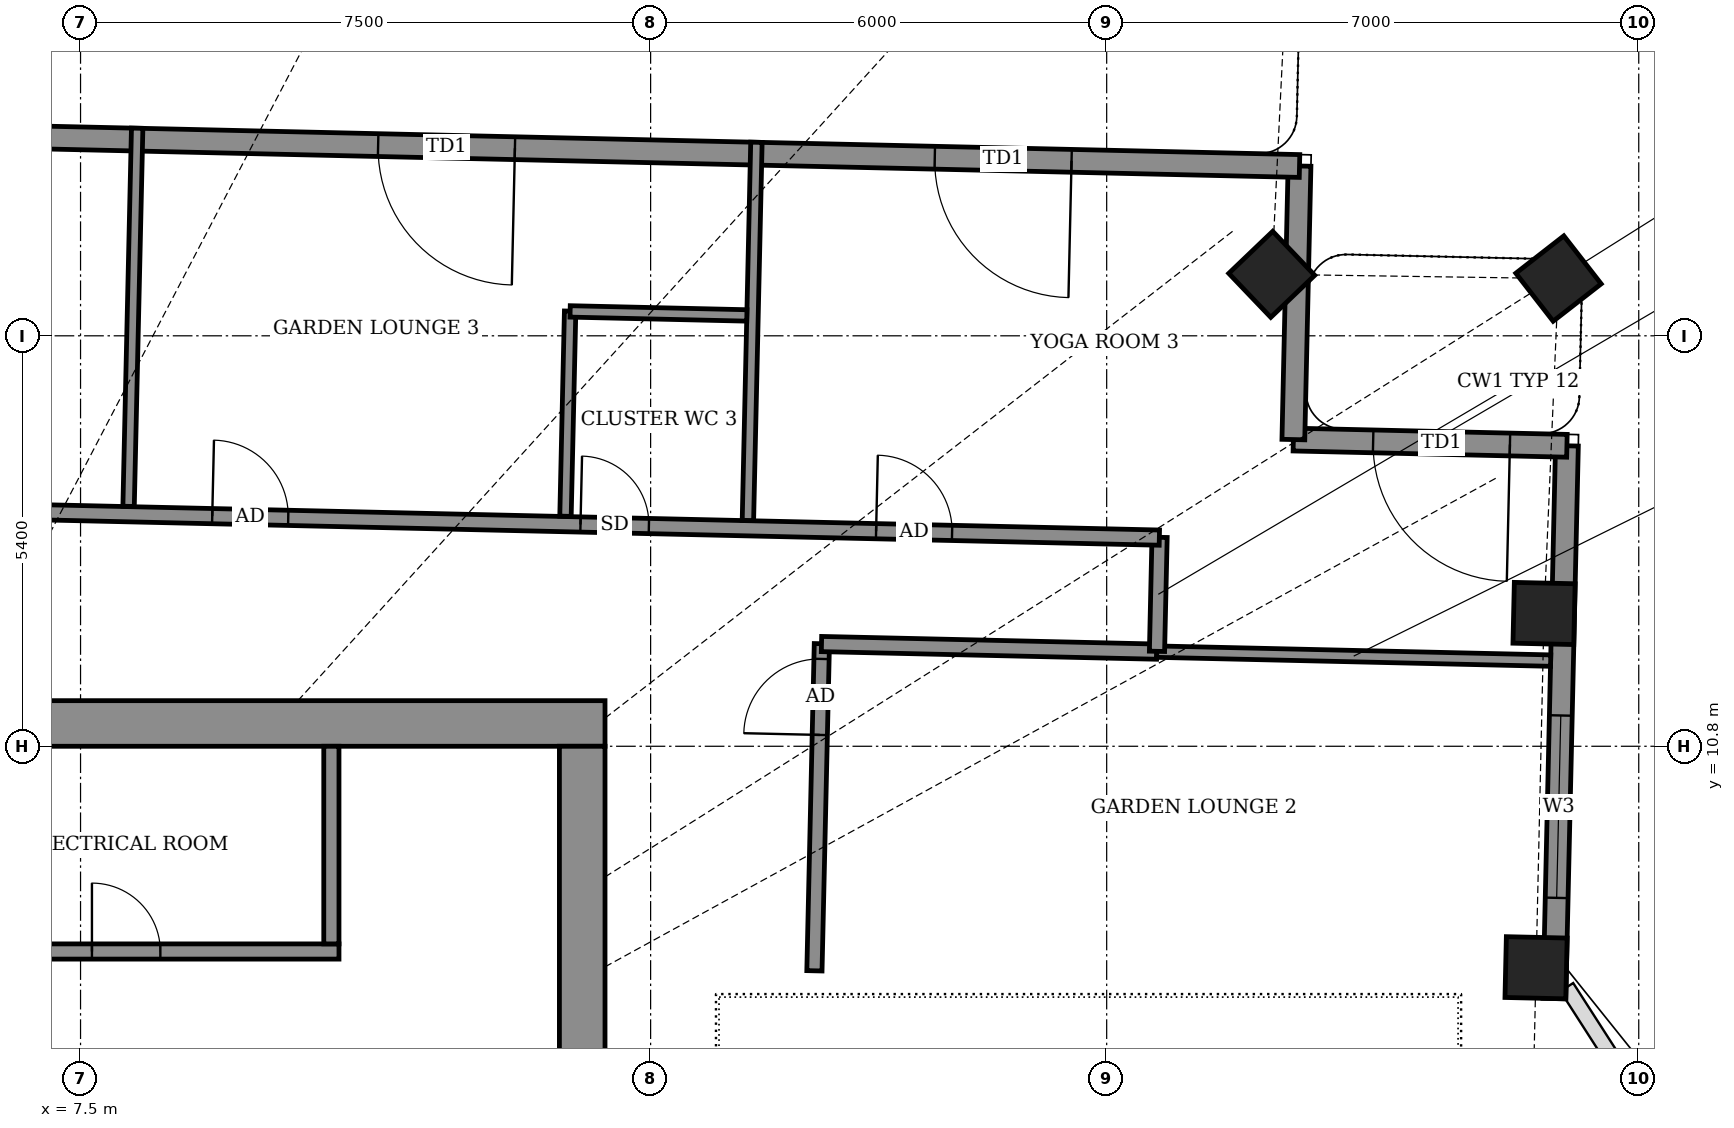
"""IFC4 building model, lengths in metres.
Left out: names, types, materials, properties, quantities, classifications, styles, units other than length and angle.
Written with IfcOpenShell. Run it as: python <this file> out.ifc"""

import sys

from ifc_helpers import new_model, si_unit, direction, frame, frame_2d, origin, origin_2d, place, context, subcontext, project, spatial, rectangle, extrude, element, fill, save


model = new_model("IFC4")
c1 = context("Model", 3, precision=1e-05, world=origin(), true_north=direction((0.0, 1.0)))
c2 = subcontext(c1, "Body", "Model", "MODEL_VIEW")
j1 = project(units=[si_unit("LENGTHUNIT", "METRE"), si_unit("PLANEANGLEUNIT", "RADIAN")], contexts=[c1])
p1 = place(None, origin())
s1 = spatial("IfcSite", under=j1, at=p1, CompositionType="ELEMENT")
p2 = place(p1, origin())
s2 = spatial("IfcBuilding", under=s1, at=p2, CompositionType="ELEMENT")
p3 = place(p2, frame((0.0, 0.0, 346.1)))
s3 = spatial("IfcBuildingStorey", under=s2, at=p3, CompositionType="ELEMENT", Elevation=346.1)
for number, where, z_axis, x_axis in (
    (1, (26.649, 7.886, -0.55), (0.0, 0.0, 1.0), (0.023, 1.0, 0.0)),
    (2, (26.754, 12.547, -0.55), (0.0, 0.0, 1.0), (0.023, 1.0, 0.0)),
    (3, (26.944, 16.953, -0.55), (0.0, 0.0, 1.0), (-0.614, 0.789, 0.0)),
    (4, (23.172, 17.009, -0.55), (0.0, 0.0, 1.0), (-0.691, 0.723, 0.0)),
):
    element("IfcColumn", number, at=place(p3, frame(where, z_axis=z_axis, x_axis=x_axis)), inside=s3, PredefinedType="COLUMN", context=c2, shape_type="SweptSolid", body=[
        extrude(rectangle(XDim=0.8, YDim=0.8, at=origin_2d()), origin(), (0.0, 0.0, 1.0), 4.6),
    ])
p4 = place(p3, frame((26.89, 7.481, 0.0), z_axis=(0.0, 0.0, 1.0), x_axis=(0.02268938335, 0.999742562805, 0.0)))
e5 = element("IfcWall", 5, at=p4, inside=s3, PredefinedType="SOLIDWALL", context=c2, shape_type="SweptSolid", body=[
    extrude(rectangle(XDim=7.274, YDim=0.3, at=frame_2d((3.637, 0.0))), origin(), (0.0, 0.0, 1.0), 2.75),
])
p5 = place(p4, frame((1.325, 0.0, 0.9)))
e6 = element("IfcOpeningElement", 6, at=p5, cuts=e5, PredefinedType="OPENING", context=c2, shape_type="SweptSolid", body=[
    extrude(rectangle(XDim=2.4, YDim=1.8, at=frame_2d((1.2, 0.9))), frame((0.0, 0.16, 0.0), z_axis=(0.0, -1.0, 0.0), x_axis=(1.0, 0.0, 0.0)), (0.0, 0.0, 1.0), 0.32),
])
p6 = place(p3, frame((27.055, 14.753, 0.0), z_axis=(0.0, 0.0, 1.0), x_axis=(-0.999740327787, 0.022787650101, 0.0)))
e7 = element("IfcWall", 7, at=p6, inside=s3, PredefinedType="SOLIDWALL", context=c2, shape_type="SweptSolid", body=[
    extrude(rectangle(XDim=3.6, YDim=0.3, at=frame_2d((1.8, 0.0))), origin(), (0.0, 0.0, 1.0), 2.55),
])
p7 = place(p6, frame((0.75, 0.0, 0.0)))
e8 = element("IfcOpeningElement", 8, at=p7, cuts=e7, PredefinedType="OPENING", context=c2, shape_type="SweptSolid", body=[
    extrude(rectangle(XDim=1.8, YDim=2.4, at=frame_2d((0.9, 1.2))), frame((0.0, 0.16, 0.0), z_axis=(0.0, -1.0, 0.0), x_axis=(1.0, 0.0, 0.0)), (0.0, 0.0, 1.0), 0.32),
])
p8 = place(p3, frame((23.456, 14.835, 0.0), z_axis=(0.0, 0.0, 1.0), x_axis=(0.022514980321, 0.999746505701, 0.0)))
e9 = element("IfcWall", 9, at=p8, inside=s3, PredefinedType="SOLIDWALL", context=c2, shape_type="SweptSolid", body=[
    extrude(rectangle(XDim=3.6, YDim=0.3, at=frame_2d((1.8, 0.0))), origin(), (0.0, 0.0, 1.0), 2.55),
])
p9 = place(p3, frame((23.537, 18.434, 0.0), z_axis=(0.0, 0.0, 1.0), x_axis=(-0.999742787513, 0.022679480066, 0.0)))
e10 = element("IfcWall", 10, at=p9, inside=s3, PredefinedType="SOLIDWALL", context=c2, shape_type="SweptSolid", body=[
    extrude(rectangle(XDim=41.8, YDim=0.3, at=frame_2d((20.9, 0.0))), origin(), (0.0, 0.0, 1.0), 2.65),
])
p10 = place(p9, frame((3.0, 0.0, 0.0)))
e11 = element("IfcOpeningElement", 11, at=p10, cuts=e10, PredefinedType="OPENING", context=c2, shape_type="SweptSolid", body=[
    extrude(rectangle(XDim=1.8, YDim=2.4, at=frame_2d((0.9, 1.2))), frame((0.0, 0.16, 0.0), z_axis=(0.0, -1.0, 0.0), x_axis=(1.0, 0.0, 0.0)), (0.0, 0.0, 1.0), 0.32),
])
p11 = place(p9, frame((10.325, 0.0, 0.0)))
e12 = element("IfcOpeningElement", 12, at=p11, cuts=e10, PredefinedType="OPENING", context=c2, shape_type="SweptSolid", body=[
    extrude(rectangle(XDim=1.8, YDim=2.4, at=frame_2d((0.9, 1.2))), frame((0.0, 0.16, 0.0), z_axis=(0.0, -1.0, 0.0), x_axis=(1.0, 0.0, 0.0)), (0.0, 0.0, 1.0), 0.32),
])
p12 = place(p9, frame((18.025, 0.0, 0.0)))
e13 = element("IfcOpeningElement", 13, at=p12, cuts=e10, PredefinedType="OPENING", context=c2, shape_type="SweptSolid", body=[
    extrude(rectangle(XDim=1.8, YDim=2.4, at=frame_2d((0.9, 1.2))), frame((0.0, 0.16, 0.0), z_axis=(0.0, -1.0, 0.0), x_axis=(1.0, 0.0, 0.0)), (0.0, 0.0, 1.0), 0.32),
])
p13 = place(p9, frame((24.025, 0.0, 0.0)))
e14 = element("IfcOpeningElement", 14, at=p13, cuts=e10, PredefinedType="OPENING", context=c2, shape_type="SweptSolid", body=[
    extrude(rectangle(XDim=1.8, YDim=2.4, at=frame_2d((0.9, 1.2))), frame((0.0, 0.16, 0.0), z_axis=(0.0, -1.0, 0.0), x_axis=(1.0, 0.0, 0.0)), (0.0, 0.0, 1.0), 0.32),
])
p14 = place(p9, frame((30.05, 0.0, 0.0)))
e15 = element("IfcOpeningElement", 15, at=p14, cuts=e10, PredefinedType="OPENING", context=c2, shape_type="SweptSolid", body=[
    extrude(rectangle(XDim=1.8, YDim=2.4, at=frame_2d((0.9, 1.2))), frame((0.0, 0.16, 0.0), z_axis=(0.0, -1.0, 0.0), x_axis=(1.0, 0.0, 0.0)), (0.0, 0.0, 1.0), 0.32),
])
p15 = place(p9, frame((37.375, 0.0, 0.0)))
e16 = element("IfcOpeningElement", 16, at=p15, cuts=e10, PredefinedType="OPENING", context=c2, shape_type="SweptSolid", body=[
    extrude(rectangle(XDim=1.8, YDim=2.4, at=frame_2d((0.9, 1.2))), frame((0.0, 0.16, 0.0), z_axis=(0.0, -1.0, 0.0), x_axis=(1.0, 0.0, 0.0)), (0.0, 0.0, 1.0), 0.32),
])
p16 = place(p3, frame((17.155, 7.846, 0.0), z_axis=(0.0, 0.0, 1.0), x_axis=(0.022745886685, 0.999741278851, 0.0)))
e17 = element("IfcWall", 17, at=p16, inside=s3, PredefinedType="PARTITIONING", context=c2, shape_type="SweptSolid", body=[
    extrude(rectangle(XDim=4.304, YDim=0.2, at=frame_2d((2.152, 0.0))), origin(), (0.0, 0.0, 1.0), 2.55),
])
p17 = place(p16, frame((3.104, 0.0, 0.0)))
e18 = element("IfcOpeningElement", 18, at=p17, cuts=e17, PredefinedType="OPENING", context=c2, shape_type="SweptSolid", body=[
    extrude(rectangle(XDim=1.0, YDim=2.1, at=frame_2d((0.5, 1.05))), frame((0.0, 0.11, 0.0), z_axis=(0.0, -1.0, 0.0), x_axis=(1.0, 0.0, 0.0)), (0.0, 0.0, 1.0), 0.22),
])
p18 = place(p3, frame((17.248, 12.145, 0.0), z_axis=(0.0, 0.0, 1.0), x_axis=(0.999742606292, -0.022687467127, 0.0)))
e19 = element("IfcWall", 19, at=p18, inside=s3, PredefinedType="PARTITIONING", context=c2, shape_type="SweptSolid", body=[
    extrude(rectangle(XDim=4.412, YDim=0.2, at=frame_2d((2.206, 0.0))), origin(), (0.0, 0.0, 1.0), 2.55),
])
p19 = place(p3, frame((21.659, 12.045, 0.0), z_axis=(0.0, 0.0, 1.0), x_axis=(0.999741202945, -0.0227492227, 0.0)))
e20 = element("IfcWall", 20, at=p19, inside=s3, PredefinedType="PARTITIONING", context=c2, shape_type="SweptSolid", body=[
    extrude(rectangle(XDim=5.183, YDim=0.15, at=frame_2d((2.592, 0.0))), origin(), (0.0, 0.0, 1.0), 2.65),
])
p20 = place(p3, frame((21.662, 12.049, 0.0), z_axis=(0.0, 0.0, 1.0), x_axis=(0.022617910375, 0.999744182344, 0.0)))
e21 = element("IfcWall", 21, at=p20, inside=s3, PredefinedType="PARTITIONING", context=c2, shape_type="SweptSolid", body=[
    extrude(rectangle(XDim=1.5, YDim=0.2, at=frame_2d((0.75, 0.0))), origin(), (0.0, 0.0, 1.0), 2.55),
])
p21 = place(p3, frame((-19.132, 14.471, 0.0), z_axis=(0.0, 0.0, 1.0), x_axis=(0.999742846934, -0.022676860534, 0.0)))
e22 = element("IfcWall", 22, at=p21, inside=s3, PredefinedType="PARTITIONING", context=c2, shape_type="SweptSolid", body=[
    extrude(rectangle(XDim=40.836, YDim=0.2, at=frame_2d((20.418, 0.0))), origin(), (0.0, 0.0, 1.0), 2.55),
])
p22 = place(p21, frame((37.108, 0.0, 0.0)))
e23 = element("IfcOpeningElement", 23, at=p22, cuts=e22, PredefinedType="OPENING", context=c2, shape_type="SweptSolid", body=[
    extrude(rectangle(XDim=1.0, YDim=2.1, at=frame_2d((0.5, 1.05))), frame((0.0, 0.11, 0.0), z_axis=(0.0, -1.0, 0.0), x_axis=(1.0, 0.0, 0.0)), (0.0, 0.0, 1.0), 0.22),
])
p23 = place(p21, frame((28.372, 0.0, 0.0)))
e24 = element("IfcOpeningElement", 24, at=p23, cuts=e22, PredefinedType="OPENING", context=c2, shape_type="SweptSolid", body=[
    extrude(rectangle(XDim=1.0, YDim=2.1, at=frame_2d((0.5, 1.05))), frame((0.0, 0.11, 0.0), z_axis=(0.0, -1.0, 0.0), x_axis=(1.0, 0.0, 0.0)), (0.0, 0.0, 1.0), 0.22),
])
p24 = place(p21, frame((33.218, 0.0, 0.0)))
e25 = element("IfcOpeningElement", 25, at=p24, cuts=e22, PredefinedType="OPENING", context=c2, shape_type="SweptSolid", body=[
    extrude(rectangle(XDim=0.9, YDim=2.1, at=frame_2d((0.45, 1.05))), frame((0.0, 0.11, 0.0), z_axis=(0.0, -1.0, 0.0), x_axis=(1.0, 0.0, 0.0)), (0.0, 0.0, 1.0), 0.22),
])
p25 = place(p21, frame((21.823, 0.0, 0.0)))
e26 = element("IfcOpeningElement", 26, at=p25, cuts=e22, PredefinedType="OPENING", context=c2, shape_type="SweptSolid", body=[
    extrude(rectangle(XDim=1.0, YDim=2.1, at=frame_2d((0.5, 1.05))), frame((0.0, 0.11, 0.0), z_axis=(0.0, -1.0, 0.0), x_axis=(1.0, 0.0, 0.0)), (0.0, 0.0, 1.0), 0.22),
])
p26 = place(p21, frame((15.468, 0.0, 0.0)))
e27 = element("IfcOpeningElement", 27, at=p26, cuts=e22, PredefinedType="OPENING", context=c2, shape_type="SweptSolid", body=[
    extrude(rectangle(XDim=1.0, YDim=2.1, at=frame_2d((0.5, 1.05))), frame((0.0, 0.11, 0.0), z_axis=(0.0, -1.0, 0.0), x_axis=(1.0, 0.0, 0.0)), (0.0, 0.0, 1.0), 0.22),
])
p27 = place(p21, frame((17.618, 0.0, 0.0)))
e28 = element("IfcOpeningElement", 28, at=p27, cuts=e22, PredefinedType="OPENING", context=c2, shape_type="SweptSolid", body=[
    extrude(rectangle(XDim=0.9, YDim=2.1, at=frame_2d((0.45, 1.05))), frame((0.0, 0.11, 0.0), z_axis=(0.0, -1.0, 0.0), x_axis=(1.0, 0.0, 0.0)), (0.0, 0.0, 1.0), 0.22),
])
p28 = place(p21, frame((9.852, 0.0, 0.0)))
e29 = element("IfcOpeningElement", 29, at=p28, cuts=e22, PredefinedType="OPENING", context=c2, shape_type="SweptSolid", body=[
    extrude(rectangle(XDim=1.0, YDim=2.1, at=frame_2d((0.5, 1.05))), frame((0.0, 0.11, 0.0), z_axis=(0.0, -1.0, 0.0), x_axis=(1.0, 0.0, 0.0)), (0.0, 0.0, 1.0), 0.22),
])
p29 = place(p21, frame((0.2, 0.0, 0.0)))
e30 = element("IfcOpeningElement", 30, at=p29, cuts=e22, PredefinedType="OPENING", context=c2, shape_type="SweptSolid", body=[
    extrude(rectangle(XDim=1.0, YDim=2.1, at=frame_2d((0.5, 1.05))), frame((0.0, 0.11, 0.0), z_axis=(0.0, -1.0, 0.0), x_axis=(1.0, 0.0, 0.0)), (0.0, 0.0, 1.0), 0.22),
])
p30 = place(p21, frame((5.568, 0.0, 0.0)))
e31 = element("IfcOpeningElement", 31, at=p30, cuts=e22, PredefinedType="OPENING", context=c2, shape_type="SweptSolid", body=[
    extrude(rectangle(XDim=0.9, YDim=2.1, at=frame_2d((0.45, 1.05))), frame((0.0, 0.11, 0.0), z_axis=(0.0, -1.0, 0.0), x_axis=(1.0, 0.0, 0.0)), (0.0, 0.0, 1.0), 0.22),
])
p31 = place(p3, frame((8.132, 13.956, 0.0), z_axis=(0.0, 0.0, 1.0), x_axis=(0.022715832973, 0.999741962174, 0.0)))
e32 = element("IfcWall", 32, at=p31, inside=s3, PredefinedType="PARTITIONING", context=c2, shape_type="SweptSolid", body=[
    extrude(rectangle(XDim=4.976, YDim=0.15, at=frame_2d((2.488, 0.0))), origin(), (0.0, 0.0, 1.0), 2.85),
])
p32 = place(p3, frame((13.88, 13.826, 0.0), z_axis=(0.0, 0.0, 1.0), x_axis=(0.02260842146, 0.999744396973, 0.0)))
e33 = element("IfcWall", 33, at=p32, inside=s3, PredefinedType="PARTITIONING", context=c2, shape_type="SweptSolid", body=[
    extrude(rectangle(XDim=2.7, YDim=0.15, at=frame_2d((1.35, 0.0))), origin(), (0.0, 0.0, 1.0), 2.85),
])
p33 = place(p3, frame((16.28, 13.771, 0.0), z_axis=(0.0, 0.0, 1.0), x_axis=(0.022518579297, 0.999746424643, 0.0)))
e34 = element("IfcWall", 34, at=p33, inside=s3, PredefinedType="PARTITIONING", context=c2, shape_type="SweptSolid", body=[
    extrude(rectangle(XDim=4.976, YDim=0.15, at=frame_2d((2.488, 0.0))), origin(), (0.0, 0.0, 1.0), 2.85),
])
p34 = place(p3, frame((13.941, 16.521, 0.0), z_axis=(0.0, 0.0, 1.0), x_axis=(0.99974053329, -0.022778632478, 0.0)))
e35 = element("IfcWall", 35, at=p34, inside=s3, PredefinedType="PARTITIONING", context=c2, shape_type="SweptSolid", body=[
    extrude(rectangle(XDim=2.326, YDim=0.15, at=frame_2d((1.163, 0.0))), origin(), (0.0, 0.0, 1.0), 2.85),
])
p35 = place(p3, frame((-14.4, 11.1, 0.0), z_axis=(0.0, 0.0, 1.0), x_axis=(1.0, 0.0, 0.0)))
e36 = element("IfcWall", 36, at=p35, inside=s3, PredefinedType="SHEAR", context=c2, shape_type="SweptSolid", body=[
    extrude(rectangle(XDim=28.8, YDim=0.6, at=frame_2d((14.4, 0.0))), origin(), (0.0, 0.0, 1.0), 4.6),
])
p36 = place(p3, frame((14.1, -10.8, 0.0), z_axis=(0.0, 0.0, 1.0), x_axis=(0.0, 1.0, 0.0)))
e37 = element("IfcWall", 37, at=p36, inside=s3, PredefinedType="SHEAR", context=c2, shape_type="SweptSolid", body=[
    extrude(rectangle(XDim=21.6, YDim=0.6, at=frame_2d((10.8, 0.0))), origin(), (0.0, 0.0, 1.0), 4.6),
])
p37 = place(p36, frame((1.2, 0.0, 0.0)))
e38 = element("IfcOpeningElement", 38, at=p37, cuts=e37, PredefinedType="OPENING", context=c2, shape_type="SweptSolid", body=[
    extrude(rectangle(XDim=1.2, YDim=2.1, at=frame_2d((0.6, 1.05))), frame((0.0, 0.31, 0.0), z_axis=(0.0, -1.0, 0.0), x_axis=(1.0, 0.0, 0.0)), (0.0, 0.0, 1.0), 0.62),
])
p38 = place(p3, frame((-10.9, 8.1, 0.0), z_axis=(0.0, 0.0, 1.0), x_axis=(1.0, 0.0, 0.0)))
e39 = element("IfcWall", 39, at=p38, inside=s3, PredefinedType="SHEAR", context=c2, shape_type="SweptSolid", body=[
    extrude(rectangle(XDim=21.8, YDim=0.2, at=frame_2d((10.9, 0.0))), origin(), (0.0, 0.0, 1.0), 4.05),
])
p39 = place(p38, frame((4.95, 0.0, 0.0)))
e40 = element("IfcOpeningElement", 40, at=p39, cuts=e39, PredefinedType="OPENING", context=c2, shape_type="SweptSolid", body=[
    extrude(rectangle(XDim=1.1, YDim=2.1, at=frame_2d((0.55, 1.05))), frame((0.0, 0.11, 0.0), z_axis=(0.0, -1.0, 0.0), x_axis=(1.0, 0.0, 0.0)), (0.0, 0.0, 1.0), 0.22),
])
p40 = place(p38, frame((7.65, 0.0, 0.0)))
e41 = element("IfcOpeningElement", 41, at=p40, cuts=e39, PredefinedType="OPENING", context=c2, shape_type="SweptSolid", body=[
    extrude(rectangle(XDim=1.1, YDim=2.1, at=frame_2d((0.55, 1.05))), frame((0.0, 0.11, 0.0), z_axis=(0.0, -1.0, 0.0), x_axis=(1.0, 0.0, 0.0)), (0.0, 0.0, 1.0), 0.22),
])
p41 = place(p38, frame((10.35, 0.0, 0.0)))
e42 = element("IfcOpeningElement", 42, at=p41, cuts=e39, PredefinedType="OPENING", context=c2, shape_type="SweptSolid", body=[
    extrude(rectangle(XDim=1.1, YDim=2.1, at=frame_2d((0.55, 1.05))), frame((0.0, 0.11, 0.0), z_axis=(0.0, -1.0, 0.0), x_axis=(1.0, 0.0, 0.0)), (0.0, 0.0, 1.0), 0.22),
])
p42 = place(p38, frame((1.675, 0.0, 0.0)))
e43 = element("IfcOpeningElement", 43, at=p42, cuts=e39, PredefinedType="OPENING", context=c2, shape_type="SweptSolid", body=[
    extrude(rectangle(XDim=0.9, YDim=2.1, at=frame_2d((0.45, 1.05))), frame((0.0, 0.11, 0.0), z_axis=(0.0, -1.0, 0.0), x_axis=(1.0, 0.0, 0.0)), (0.0, 0.0, 1.0), 0.22),
])
p43 = place(p38, frame((13.825, 0.0, 0.0)))
e44 = element("IfcOpeningElement", 44, at=p43, cuts=e39, PredefinedType="OPENING", context=c2, shape_type="SweptSolid", body=[
    extrude(rectangle(XDim=0.9, YDim=2.1, at=frame_2d((0.45, 1.05))), frame((0.0, 0.11, 0.0), z_axis=(0.0, -1.0, 0.0), x_axis=(1.0, 0.0, 0.0)), (0.0, 0.0, 1.0), 0.22),
])
p44 = place(p38, frame((18.55, 0.0, 0.0)))
e45 = element("IfcOpeningElement", 45, at=p44, cuts=e39, PredefinedType="OPENING", context=c2, shape_type="SweptSolid", body=[
    extrude(rectangle(XDim=0.9, YDim=2.1, at=frame_2d((0.45, 1.05))), frame((0.0, 0.11, 0.0), z_axis=(0.0, -1.0, 0.0), x_axis=(1.0, 0.0, 0.0)), (0.0, 0.0, 1.0), 0.22),
])
p45 = place(p3, frame((10.8, 8.2, 0.0), z_axis=(0.0, 0.0, 1.0), x_axis=(0.0, 1.0, 0.0)))
e46 = element("IfcWall", 46, at=p45, inside=s3, PredefinedType="STANDARD", context=c2, shape_type="SweptSolid", body=[
    extrude(rectangle(XDim=2.6, YDim=0.2, at=frame_2d((1.3, 0.0))), origin(), (0.0, 0.0, 1.0), 4.05),
])
p46 = place(p5, origin())
e47 = element("IfcWindow", 47, at=p46, inside=s3, PartitioningType="DOUBLE_PANEL_VERTICAL", PredefinedType="WINDOW", context=c2, shape_type="SweptSolid", body=[
    extrude(rectangle(XDim=2.4, YDim=1.8, at=frame_2d((1.2, 0.9))), frame((0.0, 0.03, 0.0), z_axis=(0.0, -1.0, 0.0), x_axis=(1.0, 0.0, 0.0)), (0.0, 0.0, 1.0), 0.06),
])
fill(e6, e47)
p47 = place(p7, origin())
e48 = element("IfcDoor", 48, at=p47, inside=s3, OperationType="DOUBLE_DOOR_SINGLE_SWING", PredefinedType="DOOR", context=c2, shape_type="SweptSolid", body=[
    extrude(rectangle(XDim=1.8, YDim=2.4, at=frame_2d((0.9, 1.2))), frame((0.0, 0.025, 0.0), z_axis=(0.0, -1.0, 0.0), x_axis=(1.0, 0.0, 0.0)), (0.0, 0.0, 1.0), 0.05),
])
fill(e8, e48)
p48 = place(p10, origin())
e49 = element("IfcDoor", 49, at=p48, inside=s3, OperationType="DOUBLE_DOOR_SINGLE_SWING", PredefinedType="DOOR", context=c2, shape_type="SweptSolid", body=[
    extrude(rectangle(XDim=1.8, YDim=2.4, at=frame_2d((0.9, 1.2))), frame((0.0, 0.025, 0.0), z_axis=(0.0, -1.0, 0.0), x_axis=(1.0, 0.0, 0.0)), (0.0, 0.0, 1.0), 0.05),
])
fill(e11, e49)
p49 = place(p11, origin())
e50 = element("IfcDoor", 50, at=p49, inside=s3, OperationType="DOUBLE_DOOR_SINGLE_SWING", PredefinedType="DOOR", context=c2, shape_type="SweptSolid", body=[
    extrude(rectangle(XDim=1.8, YDim=2.4, at=frame_2d((0.9, 1.2))), frame((0.0, 0.025, 0.0), z_axis=(0.0, -1.0, 0.0), x_axis=(1.0, 0.0, 0.0)), (0.0, 0.0, 1.0), 0.05),
])
fill(e12, e50)
p50 = place(p17, origin())
e51 = element("IfcDoor", 51, at=p50, inside=s3, OperationType="SINGLE_SWING_RIGHT", PredefinedType="DOOR", context=c2, shape_type="SweptSolid", body=[
    extrude(rectangle(XDim=1.0, YDim=2.1, at=frame_2d((0.5, 1.05))), frame((0.0, 0.025, 0.0), z_axis=(0.0, -1.0, 0.0), x_axis=(1.0, 0.0, 0.0)), (0.0, 0.0, 1.0), 0.05),
])
fill(e18, e51)
p51 = place(p22, origin())
e52 = element("IfcDoor", 52, at=p51, inside=s3, OperationType="SINGLE_SWING_LEFT", PredefinedType="DOOR", context=c2, shape_type="SweptSolid", body=[
    extrude(rectangle(XDim=1.0, YDim=2.1, at=frame_2d((0.5, 1.05))), frame((0.0, 0.025, 0.0), z_axis=(0.0, -1.0, 0.0), x_axis=(1.0, 0.0, 0.0)), (0.0, 0.0, 1.0), 0.05),
])
fill(e23, e52)
p52 = place(p23, origin())
e53 = element("IfcDoor", 53, at=p52, inside=s3, OperationType="SINGLE_SWING_RIGHT", PredefinedType="DOOR", context=c2, shape_type="SweptSolid", body=[
    extrude(rectangle(XDim=1.0, YDim=2.1, at=frame_2d((0.5, 1.05))), frame((0.0, 0.025, 0.0), z_axis=(0.0, -1.0, 0.0), x_axis=(1.0, 0.0, 0.0)), (0.0, 0.0, 1.0), 0.05),
])
fill(e24, e53)
p53 = place(p24, origin())
e54 = element("IfcDoor", 54, at=p53, inside=s3, OperationType="SINGLE_SWING_LEFT", PredefinedType="DOOR", context=c2, shape_type="SweptSolid", body=[
    extrude(rectangle(XDim=0.9, YDim=2.1, at=frame_2d((0.45, 1.05))), frame((0.0, 0.025, 0.0), z_axis=(0.0, -1.0, 0.0), x_axis=(1.0, 0.0, 0.0)), (0.0, 0.0, 1.0), 0.05),
])
fill(e25, e54)
p54 = place(p44, origin())
e55 = element("IfcDoor", 55, at=p54, inside=s3, OperationType="SINGLE_SWING_LEFT", PredefinedType="DOOR", context=c2, shape_type="SweptSolid", body=[
    extrude(rectangle(XDim=0.9, YDim=2.1, at=frame_2d((0.45, 1.05))), frame((0.0, 0.025, 0.0), z_axis=(0.0, -1.0, 0.0), x_axis=(1.0, 0.0, 0.0)), (0.0, 0.0, 1.0), 0.05),
])
fill(e45, e55)
save(model, sys.argv[1])
